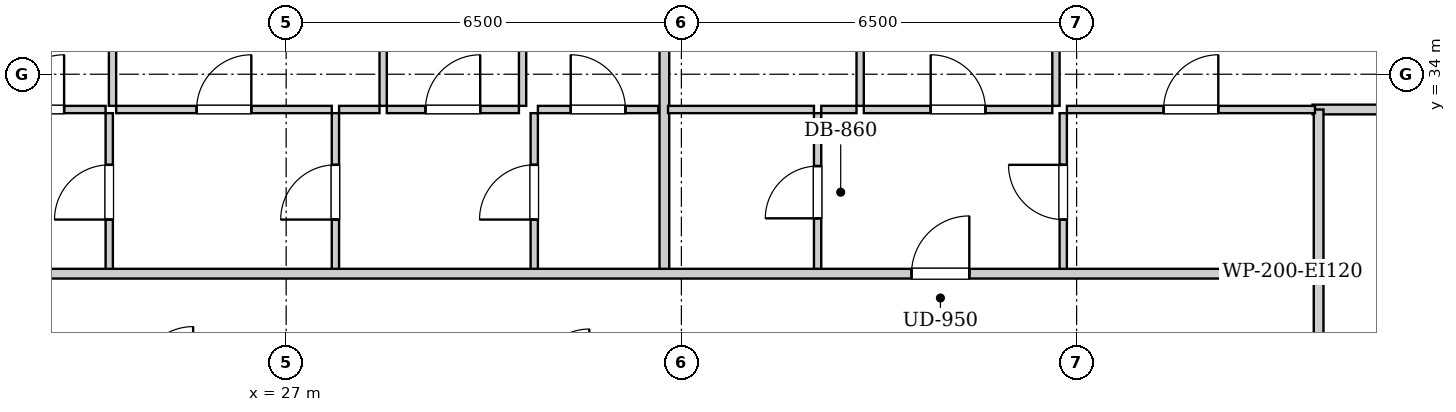
"""IFC4 building model, lengths in metres.
Left out: names, types, materials, properties, quantities, classifications, styles, units other than length and angle.
Written with IfcOpenShell. Run it as: python <this file> out.ifc"""

import sys

from ifc_helpers import new_model, si_unit, direction, frame, frame_2d, origin, place, context, subcontext, project, spatial, rectangle, extrude, element, fill, save


model = new_model("IFC4")
c1 = context("Model", 3, precision=1e-05, world=origin(), true_north=direction((0.0, 1.0)))
c2 = subcontext(c1, "Body", "Model", "MODEL_VIEW")
j1 = project(units=[si_unit("LENGTHUNIT", "METRE"), si_unit("PLANEANGLEUNIT", "RADIAN")], contexts=[c1])
p1 = place(None, origin())
s1 = spatial("IfcSite", under=j1, at=p1, CompositionType="ELEMENT")
p2 = place(p1, origin())
s2 = spatial("IfcBuilding", under=s1, at=p2, CompositionType="ELEMENT")
p3 = place(p2, frame((0.0, 0.0, 25.8)))
s3 = spatial("IfcBuildingStorey", under=s2, at=p3, CompositionType="ELEMENT", Elevation=25.8)
p4 = place(p3, frame((43.98, 28.98, 0.0), z_axis=(0.0, 0.0, 1.0), x_axis=(0.0, 1.0, 0.0)))
e1 = element("IfcWall", 1, at=p4, inside=s3, PredefinedType="PARTITIONING", context=c2, shape_type="SweptSolid", body=[
    extrude(rectangle(XDim=1.74, YDim=0.16, at=frame_2d((0.87, 0.0))), origin(), (0.0, 0.0, 1.0), 2.94),
])
p5 = place(p3, frame((24.09, 30.76, 0.0), z_axis=(0.0, 0.0, 1.0), x_axis=(0.0, 1.0, 0.0)))
e2 = element("IfcWall", 2, at=p5, inside=s3, PredefinedType="PARTITIONING", context=c2, shape_type="SweptSolid", body=[
    extrude(rectangle(XDim=2.6, YDim=0.12, at=frame_2d((1.3, 0.0))), origin(), (0.0, 0.0, 1.0), 2.94),
])
p6 = place(p5, frame((0.85, 0.0, 0.0)))
e3 = element("IfcOpeningElement", 3, at=p6, cuts=e2, PredefinedType="OPENING", context=c2, shape_type="SweptSolid", body=[
    extrude(rectangle(XDim=0.9, YDim=2.05, at=frame_2d((0.45, 1.025))), frame((0.0, 0.07, 0.0), z_axis=(0.0, -1.0, 0.0), x_axis=(1.0, 0.0, 0.0)), (0.0, 0.0, 1.0), 0.14),
])
p7 = place(p3, frame((21.767, 33.42, 0.0), z_axis=(0.0, 0.0, 1.0), x_axis=(1.0, 0.0, 0.0)))
e4 = element("IfcWall", 4, at=p7, inside=s3, PredefinedType="PARTITIONING", context=c2, shape_type="SweptSolid", body=[
    extrude(rectangle(XDim=2.263, YDim=0.12, at=frame_2d((1.131, 0.0))), origin(), (0.0, 0.0, 1.0), 2.94),
])
p8 = place(p7, frame((0.681, 0.0, 0.0)))
e5 = element("IfcOpeningElement", 5, at=p8, cuts=e4, PredefinedType="OPENING", context=c2, shape_type="SweptSolid", body=[
    extrude(rectangle(XDim=0.9, YDim=2.05, at=frame_2d((0.45, 1.025))), frame((0.0, 0.07, 0.0), z_axis=(0.0, -1.0, 0.0), x_axis=(1.0, 0.0, 0.0)), (0.0, 0.0, 1.0), 0.14),
])
p9 = place(p3, frame((27.81, 30.76, 0.0), z_axis=(0.0, 0.0, 1.0), x_axis=(0.0, 1.0, 0.0)))
e6 = element("IfcWall", 6, at=p9, inside=s3, PredefinedType="PARTITIONING", context=c2, shape_type="SweptSolid", body=[
    extrude(rectangle(XDim=2.6, YDim=0.12, at=frame_2d((1.3, 0.0))), origin(), (0.0, 0.0, 1.0), 2.94),
])
p10 = place(p9, frame((0.85, 0.0, 0.0)))
e7 = element("IfcOpeningElement", 7, at=p10, cuts=e6, PredefinedType="OPENING", context=c2, shape_type="SweptSolid", body=[
    extrude(rectangle(XDim=0.9, YDim=2.05, at=frame_2d((0.45, 1.025))), frame((0.0, 0.07, 0.0), z_axis=(0.0, -1.0, 0.0), x_axis=(1.0, 0.0, 0.0)), (0.0, 0.0, 1.0), 0.14),
])
p11 = place(p3, frame((24.204, 33.42, 0.0), z_axis=(0.0, 0.0, 1.0), x_axis=(1.0, 0.0, 0.0)))
e8 = element("IfcWall", 8, at=p11, inside=s3, PredefinedType="PARTITIONING", context=c2, shape_type="SweptSolid", body=[
    extrude(rectangle(XDim=3.546, YDim=0.12, at=frame_2d((1.773, 0.0))), origin(), (0.0, 0.0, 1.0), 2.94),
])
p12 = place(p11, frame((1.323, 0.0, 0.0)))
e9 = element("IfcOpeningElement", 9, at=p12, cuts=e8, PredefinedType="OPENING", context=c2, shape_type="SweptSolid", body=[
    extrude(rectangle(XDim=0.9, YDim=2.05, at=frame_2d((0.45, 1.025))), frame((0.0, 0.07, 0.0), z_axis=(0.0, -1.0, 0.0), x_axis=(1.0, 0.0, 0.0)), (0.0, 0.0, 1.0), 0.14),
])
p13 = place(p3, frame((31.08, 30.76, 0.0), z_axis=(0.0, 0.0, 1.0), x_axis=(0.0, 1.0, 0.0)))
e10 = element("IfcWall", 10, at=p13, inside=s3, PredefinedType="PARTITIONING", context=c2, shape_type="SweptSolid", body=[
    extrude(rectangle(XDim=2.6, YDim=0.12, at=frame_2d((1.3, 0.0))), origin(), (0.0, 0.0, 1.0), 2.94),
])
p14 = place(p13, frame((0.85, 0.0, 0.0)))
e11 = element("IfcOpeningElement", 11, at=p14, cuts=e10, PredefinedType="OPENING", context=c2, shape_type="SweptSolid", body=[
    extrude(rectangle(XDim=0.9, YDim=2.05, at=frame_2d((0.45, 1.025))), frame((0.0, 0.07, 0.0), z_axis=(0.0, -1.0, 0.0), x_axis=(1.0, 0.0, 0.0)), (0.0, 0.0, 1.0), 0.14),
])
p15 = place(p3, frame((27.87, 33.42, 0.0), z_axis=(0.0, 0.0, 1.0), x_axis=(1.0, 0.0, 0.0)))
e12 = element("IfcWall", 12, at=p15, inside=s3, PredefinedType="PARTITIONING", context=c2, shape_type="SweptSolid", body=[
    extrude(rectangle(XDim=0.665, YDim=0.12, at=frame_2d((0.333, 0.0))), origin(), (0.0, 0.0, 1.0), 2.94),
])
p16 = place(p3, frame((28.655, 33.42, 0.0), z_axis=(0.0, 0.0, 1.0), x_axis=(1.0, 0.0, 0.0)))
e13 = element("IfcWall", 13, at=p16, inside=s3, PredefinedType="PARTITIONING", context=c2, shape_type="SweptSolid", body=[
    extrude(rectangle(XDim=2.173, YDim=0.12, at=frame_2d((1.086, 0.0))), origin(), (0.0, 0.0, 1.0), 2.94),
])
p17 = place(p16, frame((0.636, 0.0, 0.0)))
e14 = element("IfcOpeningElement", 14, at=p17, cuts=e13, PredefinedType="OPENING", context=c2, shape_type="SweptSolid", body=[
    extrude(rectangle(XDim=0.9, YDim=2.05, at=frame_2d((0.45, 1.025))), frame((0.0, 0.07, 0.0), z_axis=(0.0, -1.0, 0.0), x_axis=(1.0, 0.0, 0.0)), (0.0, 0.0, 1.0), 0.14),
])
p18 = place(p3, frame((31.14, 33.42, 0.0), z_axis=(0.0, 0.0, 1.0), x_axis=(1.0, 0.0, 0.0)))
e15 = element("IfcWall", 15, at=p18, inside=s3, PredefinedType="PARTITIONING", context=c2, shape_type="SweptSolid", body=[
    extrude(rectangle(XDim=1.98, YDim=0.12, at=frame_2d((0.99, 0.0))), origin(), (0.0, 0.0, 1.0), 2.94),
])
p19 = place(p18, frame((0.54, 0.0, 0.0)))
e16 = element("IfcOpeningElement", 16, at=p19, cuts=e15, PredefinedType="OPENING", context=c2, shape_type="SweptSolid", body=[
    extrude(rectangle(XDim=0.9, YDim=2.05, at=frame_2d((0.45, 1.025))), frame((0.0, 0.07, 0.0), z_axis=(0.0, -1.0, 0.0), x_axis=(1.0, 0.0, 0.0)), (0.0, 0.0, 1.0), 0.14),
])
p20 = place(p3, frame((24.144, 33.48, 0.0), z_axis=(0.0, 0.0, 1.0), x_axis=(0.0, 1.0, 0.0)))
e17 = element("IfcWall", 17, at=p20, inside=s3, PredefinedType="PARTITIONING", context=c2, shape_type="SweptSolid", body=[
    extrude(rectangle(XDim=13.84, YDim=0.12, at=frame_2d((6.92, 0.0))), origin(), (0.0, 0.0, 1.0), 2.94),
])
p21 = place(p20, frame((6.455, 0.0, 0.0)))
e18 = element("IfcOpeningElement", 18, at=p21, cuts=e17, PredefinedType="OPENING", context=c2, shape_type="SweptSolid", body=[
    extrude(rectangle(XDim=0.9, YDim=2.05, at=frame_2d((0.45, 1.025))), frame((0.0, 0.07, 0.0), z_axis=(0.0, -1.0, 0.0), x_axis=(1.0, 0.0, 0.0)), (0.0, 0.0, 1.0), 0.14),
])
p22 = place(p3, frame((28.595, 33.48, 0.0), z_axis=(0.0, 0.0, 1.0), x_axis=(0.0, 1.0, 0.0)))
e19 = element("IfcWall", 19, at=p22, inside=s3, PredefinedType="PARTITIONING", context=c2, shape_type="SweptSolid", body=[
    extrude(rectangle(XDim=13.84, YDim=0.12, at=frame_2d((6.92, 0.0))), origin(), (0.0, 0.0, 1.0), 2.94),
])
p23 = place(p22, frame((6.455, 0.0, 0.0)))
e20 = element("IfcOpeningElement", 20, at=p23, cuts=e19, PredefinedType="OPENING", context=c2, shape_type="SweptSolid", body=[
    extrude(rectangle(XDim=0.9, YDim=2.05, at=frame_2d((0.45, 1.025))), frame((0.0, 0.07, 0.0), z_axis=(0.0, -1.0, 0.0), x_axis=(1.0, 0.0, 0.0)), (0.0, 0.0, 1.0), 0.14),
])
p24 = place(p3, frame((30.888, 33.48, 0.0), z_axis=(0.0, 0.0, 1.0), x_axis=(0.0, 1.0, 0.0)))
e21 = element("IfcWall", 21, at=p24, inside=s3, PredefinedType="PARTITIONING", context=c2, shape_type="SweptSolid", body=[
    extrude(rectangle(XDim=13.84, YDim=0.12, at=frame_2d((6.92, 0.0))), origin(), (0.0, 0.0, 1.0), 2.94),
])
p25 = place(p24, frame((6.455, 0.0, 0.0)))
e22 = element("IfcOpeningElement", 22, at=p25, cuts=e21, PredefinedType="OPENING", context=c2, shape_type="SweptSolid", body=[
    extrude(rectangle(XDim=0.9, YDim=2.05, at=frame_2d((0.45, 1.025))), frame((0.0, 0.07, 0.0), z_axis=(0.0, -1.0, 0.0), x_axis=(1.0, 0.0, 0.0)), (0.0, 0.0, 1.0), 0.14),
])
p26 = place(p3, frame((43.88, 33.42, 0.0), z_axis=(0.0, 0.0, 1.0), x_axis=(1.0, 0.0, 0.0)))
e23 = element("IfcWall", 23, at=p26, inside=s3, PredefinedType="PARTITIONING", context=c2, shape_type="SweptSolid", body=[
    extrude(rectangle(XDim=2.34, YDim=0.16, at=frame_2d((1.17, 0.0))), origin(), (0.0, 0.0, 1.0), 2.94),
])
p27 = place(p3, frame((43.98, 30.76, 0.0), z_axis=(0.0, 0.0, 1.0), x_axis=(0.0, 1.0, 0.0)))
e24 = element("IfcWall", 24, at=p27, inside=s3, PredefinedType="PARTITIONING", context=c2, shape_type="SweptSolid", body=[
    extrude(rectangle(XDim=2.66, YDim=0.16, at=frame_2d((1.33, 0.0))), origin(), (0.0, 0.0, 1.0), 2.94),
])
p28 = place(p3, frame((33.22, 30.76, 0.0), z_axis=(0.0, 0.0, 1.0), x_axis=(0.0, 1.0, 0.0)))
e25 = element("IfcWall", 25, at=p28, inside=s3, PredefinedType="PARTITIONING", context=c2, shape_type="SweptSolid", body=[
    extrude(rectangle(XDim=16.56, YDim=0.16, at=frame_2d((8.28, 0.0))), origin(), (0.0, 0.0, 1.0), 2.155),
])
p29 = place(p3, frame((35.74, 30.76, 0.0), z_axis=(0.0, 0.0, 1.0), x_axis=(0.0, 1.0, 0.0)))
e26 = element("IfcWall", 26, at=p29, inside=s3, PredefinedType="PARTITIONING", context=c2, shape_type="SweptSolid", body=[
    extrude(rectangle(XDim=2.6, YDim=0.12, at=frame_2d((1.3, 0.0))), origin(), (0.0, 0.0, 1.0), 2.94),
])
p30 = place(p29, frame((0.87, 0.0, 0.0)))
e27 = element("IfcOpeningElement", 27, at=p30, cuts=e26, PredefinedType="OPENING", context=c2, shape_type="SweptSolid", body=[
    extrude(rectangle(XDim=0.86, YDim=2.05, at=frame_2d((0.43, 1.025))), frame((0.0, 0.07, 0.0), z_axis=(0.0, -1.0, 0.0), x_axis=(1.0, 0.0, 0.0)), (0.0, 0.0, 1.0), 0.14),
])
p31 = place(p3, frame((33.28, 33.42, 0.0), z_axis=(0.0, 0.0, 1.0), x_axis=(1.0, 0.0, 0.0)))
e28 = element("IfcWall", 28, at=p31, inside=s3, PredefinedType="PARTITIONING", context=c2, shape_type="SweptSolid", body=[
    extrude(rectangle(XDim=2.4, YDim=0.12, at=frame_2d((1.2, 0.0))), origin(), (0.0, 0.0, 1.0), 2.94),
])
p32 = place(p3, frame((39.78, 30.76, 0.0), z_axis=(0.0, 0.0, 1.0), x_axis=(0.0, 1.0, 0.0)))
e29 = element("IfcWall", 29, at=p32, inside=s3, PredefinedType="PARTITIONING", context=c2, shape_type="SweptSolid", body=[
    extrude(rectangle(XDim=2.6, YDim=0.12, at=frame_2d((1.3, 0.0))), origin(), (0.0, 0.0, 1.0), 2.94),
])
p33 = place(p32, frame((0.85, 0.0, 0.0)))
e30 = element("IfcOpeningElement", 30, at=p33, cuts=e29, PredefinedType="OPENING", context=c2, shape_type="SweptSolid", body=[
    extrude(rectangle(XDim=0.9, YDim=2.05, at=frame_2d((0.45, 1.025))), frame((0.0, 0.07, 0.0), z_axis=(0.0, -1.0, 0.0), x_axis=(1.0, 0.0, 0.0)), (0.0, 0.0, 1.0), 0.14),
])
p34 = place(p3, frame((35.8, 33.42, 0.0), z_axis=(0.0, 0.0, 1.0), x_axis=(1.0, 0.0, 0.0)))
e31 = element("IfcWall", 31, at=p34, inside=s3, PredefinedType="PARTITIONING", context=c2, shape_type="SweptSolid", body=[
    extrude(rectangle(XDim=0.58, YDim=0.12, at=frame_2d((0.29, 0.0))), origin(), (0.0, 0.0, 1.0), 2.94),
])
p35 = place(p3, frame((36.5, 33.42, 0.0), z_axis=(0.0, 0.0, 1.0), x_axis=(1.0, 0.0, 0.0)))
e32 = element("IfcWall", 32, at=p35, inside=s3, PredefinedType="PARTITIONING", context=c2, shape_type="SweptSolid", body=[
    extrude(rectangle(XDim=3.1, YDim=0.12, at=frame_2d((1.55, 0.0))), origin(), (0.0, 0.0, 1.0), 2.94),
])
p36 = place(p35, frame((1.1, 0.0, 0.0)))
e33 = element("IfcOpeningElement", 33, at=p36, cuts=e32, PredefinedType="OPENING", context=c2, shape_type="SweptSolid", body=[
    extrude(rectangle(XDim=0.9, YDim=2.05, at=frame_2d((0.45, 1.025))), frame((0.0, 0.07, 0.0), z_axis=(0.0, -1.0, 0.0), x_axis=(1.0, 0.0, 0.0)), (0.0, 0.0, 1.0), 0.14),
])
p37 = place(p3, frame((39.84, 33.42, 0.0), z_axis=(0.0, 0.0, 1.0), x_axis=(1.0, 0.0, 0.0)))
e34 = element("IfcWall", 34, at=p37, inside=s3, PredefinedType="PARTITIONING", context=c2, shape_type="SweptSolid", body=[
    extrude(rectangle(XDim=4.08, YDim=0.12, at=frame_2d((2.04, 0.0))), origin(), (0.0, 0.0, 1.0), 2.94),
])
p38 = place(p37, frame((1.59, 0.0, 0.0)))
e35 = element("IfcOpeningElement", 35, at=p38, cuts=e34, PredefinedType="OPENING", context=c2, shape_type="SweptSolid", body=[
    extrude(rectangle(XDim=0.9, YDim=2.05, at=frame_2d((0.45, 1.025))), frame((0.0, 0.07, 0.0), z_axis=(0.0, -1.0, 0.0), x_axis=(1.0, 0.0, 0.0)), (0.0, 0.0, 1.0), 0.14),
])
p39 = place(p3, frame((36.44, 33.48, 0.0), z_axis=(0.0, 0.0, 1.0), x_axis=(0.0, 1.0, 0.0)))
e36 = element("IfcWall", 36, at=p39, inside=s3, PredefinedType="PARTITIONING", context=c2, shape_type="SweptSolid", body=[
    extrude(rectangle(XDim=13.84, YDim=0.12, at=frame_2d((6.92, 0.0))), origin(), (0.0, 0.0, 1.0), 2.94),
])
p40 = place(p39, frame((6.455, 0.0, 0.0)))
e37 = element("IfcOpeningElement", 37, at=p40, cuts=e36, PredefinedType="OPENING", context=c2, shape_type="SweptSolid", body=[
    extrude(rectangle(XDim=0.9, YDim=2.05, at=frame_2d((0.45, 1.025))), frame((0.0, 0.07, 0.0), z_axis=(0.0, -1.0, 0.0), x_axis=(1.0, 0.0, 0.0)), (0.0, 0.0, 1.0), 0.14),
])
p41 = place(p3, frame((39.66, 33.48, 0.0), z_axis=(0.0, 0.0, 1.0), x_axis=(0.0, 1.0, 0.0)))
e38 = element("IfcWall", 38, at=p41, inside=s3, PredefinedType="PARTITIONING", context=c2, shape_type="SweptSolid", body=[
    extrude(rectangle(XDim=11.69, YDim=0.12, at=frame_2d((5.845, 0.0))), origin(), (0.0, 0.0, 1.0), 2.94),
])
p42 = place(p41, frame((5.395, 0.0, 0.0)))
e39 = element("IfcOpeningElement", 39, at=p42, cuts=e38, PredefinedType="OPENING", context=c2, shape_type="SweptSolid", body=[
    extrude(rectangle(XDim=0.9, YDim=2.05, at=frame_2d((0.45, 1.025))), frame((0.0, 0.07, 0.0), z_axis=(0.0, -1.0, 0.0), x_axis=(1.0, 0.0, 0.0)), (0.0, 0.0, 1.0), 0.14),
])
p43 = place(p3, frame((10.05, 30.72, 0.0), z_axis=(0.0, 0.0, 1.0), x_axis=(1.0, 0.0, 0.0)))
e40 = element("IfcWall", 40, at=p43, inside=s3, PredefinedType="PARTITIONING", context=c2, shape_type="SweptSolid", body=[
    extrude(rectangle(XDim=33.9, YDim=0.16, at=frame_2d((16.95, 0.0))), origin(), (0.0, 0.0, 1.0), 2.94),
])
p44 = place(p43, frame((4.295, 0.0, 0.0)))
e41 = element("IfcOpeningElement", 41, at=p44, cuts=e40, PredefinedType="OPENING", context=c2, shape_type="SweptSolid", body=[
    extrude(rectangle(XDim=0.95, YDim=2.1, at=frame_2d((0.475, 1.05))), frame((0.0, 0.09, 0.0), z_axis=(0.0, -1.0, 0.0), x_axis=(1.0, 0.0, 0.0)), (0.0, 0.0, 1.0), 0.18),
])
p45 = place(p43, frame((27.235, 0.0, 0.0)))
e42 = element("IfcOpeningElement", 42, at=p45, cuts=e40, PredefinedType="OPENING", context=c2, shape_type="SweptSolid", body=[
    extrude(rectangle(XDim=0.95, YDim=2.1, at=frame_2d((0.475, 1.05))), frame((0.0, 0.09, 0.0), z_axis=(0.0, -1.0, 0.0), x_axis=(1.0, 0.0, 0.0)), (0.0, 0.0, 1.0), 0.18),
])
p46 = place(p6, origin())
e43 = element("IfcDoor", 43, at=p46, inside=s3, OperationType="SINGLE_SWING_LEFT", PredefinedType="DOOR", context=c2, shape_type="SweptSolid", body=[
    extrude(rectangle(XDim=0.9, YDim=2.05, at=frame_2d((0.45, 1.025))), frame((0.0, 0.025, 0.0), z_axis=(0.0, -1.0, 0.0), x_axis=(1.0, 0.0, 0.0)), (0.0, 0.0, 1.0), 0.05),
])
fill(e3, e43)
p47 = place(p8, origin())
e44 = element("IfcDoor", 44, at=p47, inside=s3, OperationType="SINGLE_SWING_RIGHT", PredefinedType="DOOR", context=c2, shape_type="SweptSolid", body=[
    extrude(rectangle(XDim=0.9, YDim=2.05, at=frame_2d((0.45, 1.025))), frame((0.0, 0.025, 0.0), z_axis=(0.0, -1.0, 0.0), x_axis=(1.0, 0.0, 0.0)), (0.0, 0.0, 1.0), 0.05),
])
fill(e5, e44)
p48 = place(p10, origin())
e45 = element("IfcDoor", 45, at=p48, inside=s3, OperationType="SINGLE_SWING_LEFT", PredefinedType="DOOR", context=c2, shape_type="SweptSolid", body=[
    extrude(rectangle(XDim=0.9, YDim=2.05, at=frame_2d((0.45, 1.025))), frame((0.0, 0.025, 0.0), z_axis=(0.0, -1.0, 0.0), x_axis=(1.0, 0.0, 0.0)), (0.0, 0.0, 1.0), 0.05),
])
fill(e7, e45)
p49 = place(p12, origin())
e46 = element("IfcDoor", 46, at=p49, inside=s3, OperationType="SINGLE_SWING_RIGHT", PredefinedType="DOOR", context=c2, shape_type="SweptSolid", body=[
    extrude(rectangle(XDim=0.9, YDim=2.05, at=frame_2d((0.45, 1.025))), frame((0.0, 0.025, 0.0), z_axis=(0.0, -1.0, 0.0), x_axis=(1.0, 0.0, 0.0)), (0.0, 0.0, 1.0), 0.05),
])
fill(e9, e46)
p50 = place(p14, origin())
e47 = element("IfcDoor", 47, at=p50, inside=s3, OperationType="SINGLE_SWING_LEFT", PredefinedType="DOOR", context=c2, shape_type="SweptSolid", body=[
    extrude(rectangle(XDim=0.9, YDim=2.05, at=frame_2d((0.45, 1.025))), frame((0.0, 0.025, 0.0), z_axis=(0.0, -1.0, 0.0), x_axis=(1.0, 0.0, 0.0)), (0.0, 0.0, 1.0), 0.05),
])
fill(e11, e47)
p51 = place(p17, origin())
e48 = element("IfcDoor", 48, at=p51, inside=s3, OperationType="SINGLE_SWING_RIGHT", PredefinedType="DOOR", context=c2, shape_type="SweptSolid", body=[
    extrude(rectangle(XDim=0.9, YDim=2.05, at=frame_2d((0.45, 1.025))), frame((0.0, 0.025, 0.0), z_axis=(0.0, -1.0, 0.0), x_axis=(1.0, 0.0, 0.0)), (0.0, 0.0, 1.0), 0.05),
])
fill(e14, e48)
p52 = place(p19, origin())
e49 = element("IfcDoor", 49, at=p52, inside=s3, OperationType="SINGLE_SWING_LEFT", PredefinedType="DOOR", context=c2, shape_type="SweptSolid", body=[
    extrude(rectangle(XDim=0.9, YDim=2.05, at=frame_2d((0.45, 1.025))), frame((0.0, 0.025, 0.0), z_axis=(0.0, -1.0, 0.0), x_axis=(1.0, 0.0, 0.0)), (0.0, 0.0, 1.0), 0.05),
])
fill(e16, e49)
p53 = place(p30, origin())
e50 = element("IfcDoor", 50, at=p53, inside=s3, OperationType="SINGLE_SWING_LEFT", PredefinedType="DOOR", context=c2, shape_type="SweptSolid", body=[
    extrude(rectangle(XDim=0.86, YDim=2.05, at=frame_2d((0.43, 1.025))), frame((0.0, 0.025, 0.0), z_axis=(0.0, -1.0, 0.0), x_axis=(1.0, 0.0, 0.0)), (0.0, 0.0, 1.0), 0.05),
])
fill(e27, e50)
p54 = place(p33, origin())
e51 = element("IfcDoor", 51, at=p54, inside=s3, OperationType="SINGLE_SWING_RIGHT", PredefinedType="DOOR", context=c2, shape_type="SweptSolid", body=[
    extrude(rectangle(XDim=0.9, YDim=2.05, at=frame_2d((0.45, 1.025))), frame((0.0, 0.025, 0.0), z_axis=(0.0, -1.0, 0.0), x_axis=(1.0, 0.0, 0.0)), (0.0, 0.0, 1.0), 0.05),
])
fill(e30, e51)
p55 = place(p36, origin())
e52 = element("IfcDoor", 52, at=p55, inside=s3, OperationType="SINGLE_SWING_LEFT", PredefinedType="DOOR", context=c2, shape_type="SweptSolid", body=[
    extrude(rectangle(XDim=0.9, YDim=2.05, at=frame_2d((0.45, 1.025))), frame((0.0, 0.025, 0.0), z_axis=(0.0, -1.0, 0.0), x_axis=(1.0, 0.0, 0.0)), (0.0, 0.0, 1.0), 0.05),
])
fill(e33, e52)
p56 = place(p38, origin())
e53 = element("IfcDoor", 53, at=p56, inside=s3, OperationType="SINGLE_SWING_RIGHT", PredefinedType="DOOR", context=c2, shape_type="SweptSolid", body=[
    extrude(rectangle(XDim=0.9, YDim=2.05, at=frame_2d((0.45, 1.025))), frame((0.0, 0.025, 0.0), z_axis=(0.0, -1.0, 0.0), x_axis=(1.0, 0.0, 0.0)), (0.0, 0.0, 1.0), 0.05),
])
fill(e35, e53)
p57 = place(p45, origin())
e54 = element("IfcDoor", 54, at=p57, inside=s3, OperationType="SINGLE_SWING_RIGHT", PredefinedType="DOOR", context=c2, shape_type="SweptSolid", body=[
    extrude(rectangle(XDim=0.95, YDim=2.1, at=frame_2d((0.475, 1.05))), frame((0.0, 0.025, 0.0), z_axis=(0.0, -1.0, 0.0), x_axis=(1.0, 0.0, 0.0)), (0.0, 0.0, 1.0), 0.05),
])
fill(e42, e54)
save(model, sys.argv[1])
